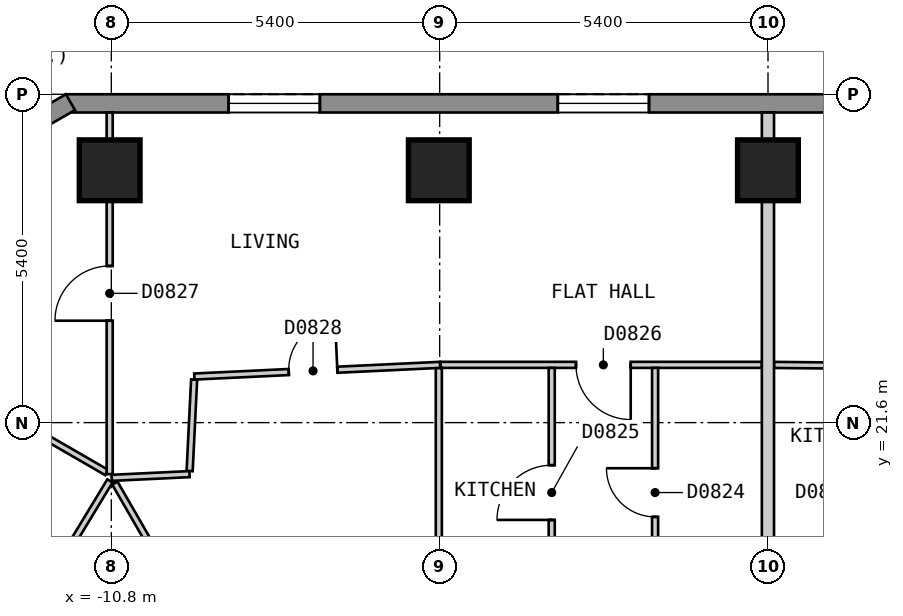
"""IFC4 building model, lengths in metres.
Left out: names, types, materials, properties, quantities, classifications, styles, units other than length and angle.
Written with IfcOpenShell. Run it as: python <this file> out.ifc"""

import sys

from ifc_helpers import new_model, si_unit, direction, frame, frame_2d, origin, origin_2d, place, context, subcontext, project, spatial, polyline, rectangle, outline, extrude, element, fill, save


model = new_model("IFC4")
c1 = context("Model", 3, precision=1e-05, world=origin(), true_north=direction((0.0, 1.0)))
c2 = subcontext(c1, "Body", "Model", "MODEL_VIEW")
j1 = project(units=[si_unit("LENGTHUNIT", "METRE"), si_unit("PLANEANGLEUNIT", "RADIAN")], contexts=[c1])
p1 = place(None, origin())
s1 = spatial("IfcSite", under=j1, at=p1, CompositionType="ELEMENT")
p2 = place(p1, origin())
s2 = spatial("IfcBuilding", under=s1, at=p2, CompositionType="ELEMENT")
p3 = place(p2, frame((0.0, 0.0, 72.0)))
s3 = spatial("IfcBuildingStorey", under=s2, at=p3, CompositionType="ELEMENT", Elevation=72.0)
for number, where, z_axis, x_axis in (
    (1, (-0.001, 25.75, 0.0), (0.0, 0.0, 1.0), (-1.0, 0.0, 0.0)),
    (2, (-5.414, 25.75, 0.0), (0.0, 0.0, 1.0), (-1.0, 0.0, 0.0)),
    (3, (-10.827, 25.75, 0.0), (0.0, 0.0, 1.0), (-1.0, 0.0, 0.0)),
):
    element("IfcColumn", number, at=place(p3, frame(where, z_axis=z_axis, x_axis=x_axis)), inside=s3, PredefinedType="COLUMN", context=c2, shape_type="SweptSolid", body=[
        extrude(rectangle(XDim=1.0, YDim=1.0, at=origin_2d()), origin(), (0.0, 0.0, 1.0), 3.0),
    ])
p4 = place(p3, frame((11.547, 26.85, 0.0), z_axis=(0.0, 0.0, 1.0), x_axis=(-1.0, 0.0, 0.0)))
e4 = element("IfcWall", 4, at=p4, inside=s3, PredefinedType="SOLIDWALL", context=c2, shape_type="SweptSolid", body=[
    extrude(outline(polyline([(0.0, -0.15), (23.094, -0.15), (23.014, 0.15), (0.08, 0.15), (0.0, -0.15)])), origin(), (0.0, 0.0, 1.0), 2.7),
])
p5 = place(p4, frame((2.678, 0.0, 0.15)))
e5 = element("IfcOpeningElement", 5, at=p5, cuts=e4, PredefinedType="OPENING", context=c2, shape_type="SweptSolid", body=[
    extrude(rectangle(XDim=1.5, YDim=2.1, at=frame_2d((0.75, 1.05))), frame((0.0, 0.16, 0.0), z_axis=(0.0, -1.0, 0.0), x_axis=(1.0, 0.0, 0.0)), (0.0, 0.0, 1.0), 0.32),
])
p6 = place(p4, frame((8.092, 0.0, 0.15)))
e6 = element("IfcOpeningElement", 6, at=p6, cuts=e4, PredefinedType="OPENING", context=c2, shape_type="SweptSolid", body=[
    extrude(rectangle(XDim=1.5, YDim=2.1, at=frame_2d((0.75, 1.05))), frame((0.0, 0.16, 0.0), z_axis=(0.0, -1.0, 0.0), x_axis=(1.0, 0.0, 0.0)), (0.0, 0.0, 1.0), 0.32),
])
p7 = place(p4, frame((13.504, 0.0, 0.15)))
e7 = element("IfcOpeningElement", 7, at=p7, cuts=e4, PredefinedType="OPENING", context=c2, shape_type="SweptSolid", body=[
    extrude(rectangle(XDim=1.5, YDim=2.1, at=frame_2d((0.75, 1.05))), frame((0.0, 0.16, 0.0), z_axis=(0.0, -1.0, 0.0), x_axis=(1.0, 0.0, 0.0)), (0.0, 0.0, 1.0), 0.32),
])
p8 = place(p4, frame((18.917, 0.0, 0.15)))
e8 = element("IfcOpeningElement", 8, at=p8, cuts=e4, PredefinedType="OPENING", context=c2, shape_type="SweptSolid", body=[
    extrude(rectangle(XDim=1.5, YDim=2.1, at=frame_2d((0.75, 1.05))), frame((0.0, 0.16, 0.0), z_axis=(0.0, -1.0, 0.0), x_axis=(1.0, 0.0, 0.0)), (0.0, 0.0, 1.0), 0.32),
])
p9 = place(p3, frame((-11.472, 26.87, 0.0), z_axis=(0.0, 0.0, 1.0), x_axis=(-0.866022959057, -0.500004234368, 0.0)))
e9 = element("IfcWall", 9, at=p9, inside=s3, PredefinedType="SOLIDWALL", context=c2, shape_type="SweptSolid", body=[
    extrude(outline(polyline([(0.0, -0.15), (5.0, -0.15), (4.92, 0.15), (0.08, 0.15), (0.0, -0.15)])), origin(), (0.0, 0.0, 1.0), 2.7),
])
p10 = place(p9, frame((0.65, 0.0, 0.15)))
e10 = element("IfcOpeningElement", 10, at=p10, cuts=e9, PredefinedType="OPENING", context=c2, shape_type="SweptSolid", body=[
    extrude(rectangle(XDim=1.2, YDim=2.1, at=frame_2d((0.6, 1.05))), frame((0.0, 0.16, 0.0), z_axis=(0.0, -1.0, 0.0), x_axis=(1.0, 0.0, 0.0)), (0.0, 0.0, 1.0), 0.32),
])
p11 = place(p3, frame((0.099, 22.549, 0.0), z_axis=(0.0, 0.0, 1.0), x_axis=(0.99995279897, -0.009715957599, 0.0)))
e11 = element("IfcWall", 11, at=p11, inside=s3, PredefinedType="PARTITIONING", context=c2, shape_type="SweptSolid", body=[
    extrude(rectangle(XDim=2.161, YDim=0.1, at=frame_2d((1.081, 0.0))), origin(), (0.0, 0.0, 1.0), 2.7),
])
p12 = place(p3, frame((-10.742, 20.606, 0.0), z_axis=(0.0, 0.0, 1.0), x_axis=(0.50003312339, -0.866006279142, 0.0)))
e12 = element("IfcWall", 12, at=p12, inside=s3, PredefinedType="PARTITIONING", context=c2, shape_type="SweptSolid", body=[
    extrude(rectangle(XDim=4.626, YDim=0.1, at=frame_2d((2.313, 0.0))), origin(), (0.0, 0.0, 1.0), 2.7),
])
p13 = place(p3, frame((-15.977, 23.725, 0.0), z_axis=(0.0, 0.0, 1.0), x_axis=(0.866028213039, -0.499995134196, 0.0)))
e13 = element("IfcWall", 13, at=p13, inside=s3, PredefinedType="PARTITIONING", context=c2, shape_type="SweptSolid", body=[
    extrude(rectangle(XDim=5.89, YDim=0.1, at=frame_2d((2.945, 0.0))), origin(), (0.0, 0.0, 1.0), 2.7),
])
p14 = place(p13, frame((2.524, 0.0, 0.0)))
e14 = element("IfcOpeningElement", 14, at=p14, cuts=e13, PredefinedType="OPENING", context=c2, shape_type="SweptSolid", body=[
    extrude(rectangle(XDim=0.9, YDim=2.1, at=frame_2d((0.45, 1.05))), frame((0.0, 0.06, 0.0), z_axis=(0.0, -1.0, 0.0), x_axis=(1.0, 0.0, 0.0)), (0.0, 0.0, 1.0), 0.12),
])
p15 = place(p3, frame((-5.384, 22.55, 0.0), z_axis=(0.0, 0.0, 1.0), x_axis=(1.0, 0.0, 0.0)))
e15 = element("IfcWall", 15, at=p15, inside=s3, PredefinedType="PARTITIONING", context=c2, shape_type="SweptSolid", body=[
    extrude(rectangle(XDim=5.283, YDim=0.1, at=frame_2d((2.642, 0.0))), origin(), (0.0, 0.0, 1.0), 2.7),
])
p16 = place(p15, frame((2.226, 0.0, 0.0)))
e16 = element("IfcOpeningElement", 16, at=p16, cuts=e15, PredefinedType="OPENING", context=c2, shape_type="SweptSolid", body=[
    extrude(rectangle(XDim=0.9, YDim=2.1, at=frame_2d((0.45, 1.05))), frame((0.0, 0.06, 0.0), z_axis=(0.0, -1.0, 0.0), x_axis=(1.0, 0.0, 0.0)), (0.0, 0.0, 1.0), 0.12),
])
p17 = place(p3, frame((-13.328, 16.511, 0.0), z_axis=(0.0, 0.0, 1.0), x_axis=(0.518570528669, 0.855034857065, 0.0)))
e17 = element("IfcWall", 17, at=p17, inside=s3, PredefinedType="PARTITIONING", context=c2, shape_type="SweptSolid", body=[
    extrude(rectangle(XDim=4.83, YDim=0.1, at=frame_2d((2.415, 0.0))), origin(), (0.0, 0.0, 1.0), 2.7),
])
p18 = place(p17, frame((1.995, 0.0, 0.0)))
e18 = element("IfcOpeningElement", 18, at=p18, cuts=e17, PredefinedType="OPENING", context=c2, shape_type="SweptSolid", body=[
    extrude(rectangle(XDim=0.8, YDim=2.1, at=frame_2d((0.4, 1.05))), frame((0.0, 0.06, 0.0), z_axis=(0.0, -1.0, 0.0), x_axis=(1.0, 0.0, 0.0)), (0.0, 0.0, 1.0), 0.12),
])
p19 = place(p3, frame((-9.512, 20.803, 0.0), z_axis=(0.0, 0.0, 1.0), x_axis=(0.049089165168, 0.998794400196, 0.0)))
e19 = element("IfcWall", 19, at=p19, inside=s3, PredefinedType="PARTITIONING", context=c2, shape_type="SweptSolid", body=[
    extrude(rectangle(XDim=1.507, YDim=0.1, at=frame_2d((0.753, 0.0))), origin(), (0.0, 0.0, 1.0), 2.7),
])
p20 = place(p3, frame((-3.557, 18.45, 0.0), z_axis=(0.0, 0.0, 1.0), x_axis=(0.0, 1.0, 0.0)))
e20 = element("IfcWall", 20, at=p20, inside=s3, PredefinedType="PARTITIONING", context=c2, shape_type="SweptSolid", body=[
    extrude(rectangle(XDim=4.05, YDim=0.1, at=frame_2d((2.025, 0.0))), origin(), (0.0, 0.0, 1.0), 2.7),
])
p21 = place(p20, frame((1.55, 0.0, 0.0)))
e21 = element("IfcOpeningElement", 21, at=p21, cuts=e20, PredefinedType="OPENING", context=c2, shape_type="SweptSolid", body=[
    extrude(rectangle(XDim=0.9, YDim=2.1, at=frame_2d((0.45, 1.05))), frame((0.0, 0.06, 0.0), z_axis=(0.0, -1.0, 0.0), x_axis=(1.0, 0.0, 0.0)), (0.0, 0.0, 1.0), 0.12),
])
p22 = place(p3, frame((-5.414, 18.35, 0.0), z_axis=(0.0, 0.0, 1.0), x_axis=(0.0, 1.0, 0.0)))
e22 = element("IfcWall", 22, at=p22, inside=s3, PredefinedType="PARTITIONING", context=c2, shape_type="SweptSolid", body=[
    extrude(rectangle(XDim=4.15, YDim=0.1, at=frame_2d((2.075, 0.0))), origin(), (0.0, 0.0, 1.0), 2.7),
])
p23 = place(p3, frame((-10.827, 20.753, 0.0), z_axis=(0.0, 0.0, 1.0), x_axis=(0.0, 1.0, 0.0)))
e23 = element("IfcWall", 23, at=p23, inside=s3, PredefinedType="PARTITIONING", context=c2, shape_type="SweptSolid", body=[
    extrude(rectangle(XDim=5.947, YDim=0.1, at=frame_2d((2.974, 0.0))), origin(), (0.0, 0.0, 1.0), 2.7),
])
p24 = place(p23, frame((2.523, 0.0, 0.0)))
e24 = element("IfcOpeningElement", 24, at=p24, cuts=e23, PredefinedType="OPENING", context=c2, shape_type="SweptSolid", body=[
    extrude(rectangle(XDim=0.9, YDim=2.1, at=frame_2d((0.45, 1.05))), frame((0.0, 0.06, 0.0), z_axis=(0.0, -1.0, 0.0), x_axis=(1.0, 0.0, 0.0)), (0.0, 0.0, 1.0), 0.12),
])
p25 = place(p3, frame((-1.857, 18.45, 0.0), z_axis=(0.0, 0.0, 1.0), x_axis=(0.0, 1.0, 0.0)))
e25 = element("IfcWall", 25, at=p25, inside=s3, PredefinedType="PARTITIONING", context=c2, shape_type="SweptSolid", body=[
    extrude(rectangle(XDim=4.05, YDim=0.1, at=frame_2d((2.025, 0.0))), origin(), (0.0, 0.0, 1.0), 2.7),
])
p26 = place(p25, frame((1.6, 0.0, 0.0)))
e26 = element("IfcOpeningElement", 26, at=p26, cuts=e25, PredefinedType="OPENING", context=c2, shape_type="SweptSolid", body=[
    extrude(rectangle(XDim=0.8, YDim=2.1, at=frame_2d((0.4, 1.05))), frame((0.0, 0.06, 0.0), z_axis=(0.0, -1.0, 0.0), x_axis=(1.0, 0.0, 0.0)), (0.0, 0.0, 1.0), 0.12),
])
p27 = place(p3, frame((-10.792, 20.692, 0.0), z_axis=(0.0, 0.0, 1.0), x_axis=(0.998861653202, 0.04770112957, 0.0)))
e27 = element("IfcWall", 27, at=p27, inside=s3, PredefinedType="PARTITIONING", context=c2, shape_type="SweptSolid", body=[
    extrude(rectangle(XDim=1.28, YDim=0.1, at=frame_2d((0.64, 0.0))), origin(), (0.0, 0.0, 1.0), 2.7),
])
p28 = place(p3, frame((-9.435, 22.358, 0.0), z_axis=(0.0, 0.0, 1.0), x_axis=(0.998871548472, 0.04749346959, 0.0)))
e28 = element("IfcWall", 28, at=p28, inside=s3, PredefinedType="PARTITIONING", context=c2, shape_type="SweptSolid", body=[
    extrude(rectangle(XDim=4.046, YDim=0.1, at=frame_2d((2.023, 0.0))), origin(), (0.0, 0.0, 1.0), 2.7),
])
p29 = place(p28, frame((1.555, 0.0, 0.0)))
e29 = element("IfcOpeningElement", 29, at=p29, cuts=e28, PredefinedType="OPENING", context=c2, shape_type="SweptSolid", body=[
    extrude(rectangle(XDim=0.8, YDim=2.1, at=frame_2d((0.4, 1.05))), frame((0.0, 0.06, 0.0), z_axis=(0.0, -1.0, 0.0), x_axis=(1.0, 0.0, 0.0)), (0.0, 0.0, 1.0), 0.12),
])
p30 = place(p3, frame((-0.001, 18.45, 0.0), z_axis=(0.0, 0.0, 1.0), x_axis=(0.0, 1.0, 0.0)))
e30 = element("IfcWall", 30, at=p30, inside=s3, PredefinedType="PARTITIONING", context=c2, shape_type="SweptSolid", body=[
    extrude(rectangle(XDim=8.25, YDim=0.2, at=frame_2d((4.125, 0.0))), origin(), (0.0, 0.0, 1.0), 2.7),
])
p31 = place(p7, origin())
e31 = element("IfcWindow", 31, at=p31, inside=s3, PartitioningType="SINGLE_PANEL", PredefinedType="WINDOW", context=c2, shape_type="SweptSolid", body=[
    extrude(rectangle(XDim=1.5, YDim=2.1, at=frame_2d((0.75, 1.05))), frame((0.0, 0.03, 0.0), z_axis=(0.0, -1.0, 0.0), x_axis=(1.0, 0.0, 0.0)), (0.0, 0.0, 1.0), 0.06),
])
fill(e7, e31)
p32 = place(p8, origin())
e32 = element("IfcWindow", 32, at=p32, inside=s3, PartitioningType="SINGLE_PANEL", PredefinedType="WINDOW", context=c2, shape_type="SweptSolid", body=[
    extrude(rectangle(XDim=1.5, YDim=2.1, at=frame_2d((0.75, 1.05))), frame((0.0, 0.03, 0.0), z_axis=(0.0, -1.0, 0.0), x_axis=(1.0, 0.0, 0.0)), (0.0, 0.0, 1.0), 0.06),
])
fill(e8, e32)
p33 = place(p26, origin())
e33 = element("IfcDoor", 33, at=p33, inside=s3, OperationType="SINGLE_SWING_RIGHT", PredefinedType="DOOR", context=c2, shape_type="SweptSolid", body=[
    extrude(rectangle(XDim=0.8, YDim=2.1, at=frame_2d((0.4, 1.05))), frame((0.0, 0.025, 0.0), z_axis=(0.0, -1.0, 0.0), x_axis=(1.0, 0.0, 0.0)), (0.0, 0.0, 1.0), 0.05),
])
fill(e26, e33)
p34 = place(p21, origin())
e34 = element("IfcDoor", 34, at=p34, inside=s3, OperationType="SINGLE_SWING_LEFT", PredefinedType="DOOR", context=c2, shape_type="SweptSolid", body=[
    extrude(rectangle(XDim=0.9, YDim=2.1, at=frame_2d((0.45, 1.05))), frame((0.0, 0.025, 0.0), z_axis=(0.0, -1.0, 0.0), x_axis=(1.0, 0.0, 0.0)), (0.0, 0.0, 1.0), 0.05),
])
fill(e21, e34)
p35 = place(p16, origin())
e35 = element("IfcDoor", 35, at=p35, inside=s3, OperationType="SINGLE_SWING_RIGHT", PredefinedType="DOOR", context=c2, shape_type="SweptSolid", body=[
    extrude(rectangle(XDim=0.9, YDim=2.1, at=frame_2d((0.45, 1.05))), frame((0.0, 0.025, 0.0), z_axis=(0.0, -1.0, 0.0), x_axis=(1.0, 0.0, 0.0)), (0.0, 0.0, 1.0), 0.05),
])
fill(e16, e35)
p36 = place(p24, origin())
e36 = element("IfcDoor", 36, at=p36, inside=s3, OperationType="SINGLE_SWING_LEFT", PredefinedType="DOOR", context=c2, shape_type="SweptSolid", body=[
    extrude(rectangle(XDim=0.9, YDim=2.1, at=frame_2d((0.45, 1.05))), frame((0.0, 0.025, 0.0), z_axis=(0.0, -1.0, 0.0), x_axis=(1.0, 0.0, 0.0)), (0.0, 0.0, 1.0), 0.05),
])
fill(e24, e36)
p37 = place(p29, origin())
e37 = element("IfcDoor", 37, at=p37, inside=s3, OperationType="SINGLE_SWING_RIGHT", PredefinedType="DOOR", context=c2, shape_type="SweptSolid", body=[
    extrude(rectangle(XDim=0.8, YDim=2.1, at=frame_2d((0.4, 1.05))), frame((0.0, 0.025, 0.0), z_axis=(0.0, -1.0, 0.0), x_axis=(1.0, 0.0, 0.0)), (0.0, 0.0, 1.0), 0.05),
])
fill(e29, e37)
save(model, sys.argv[1])
